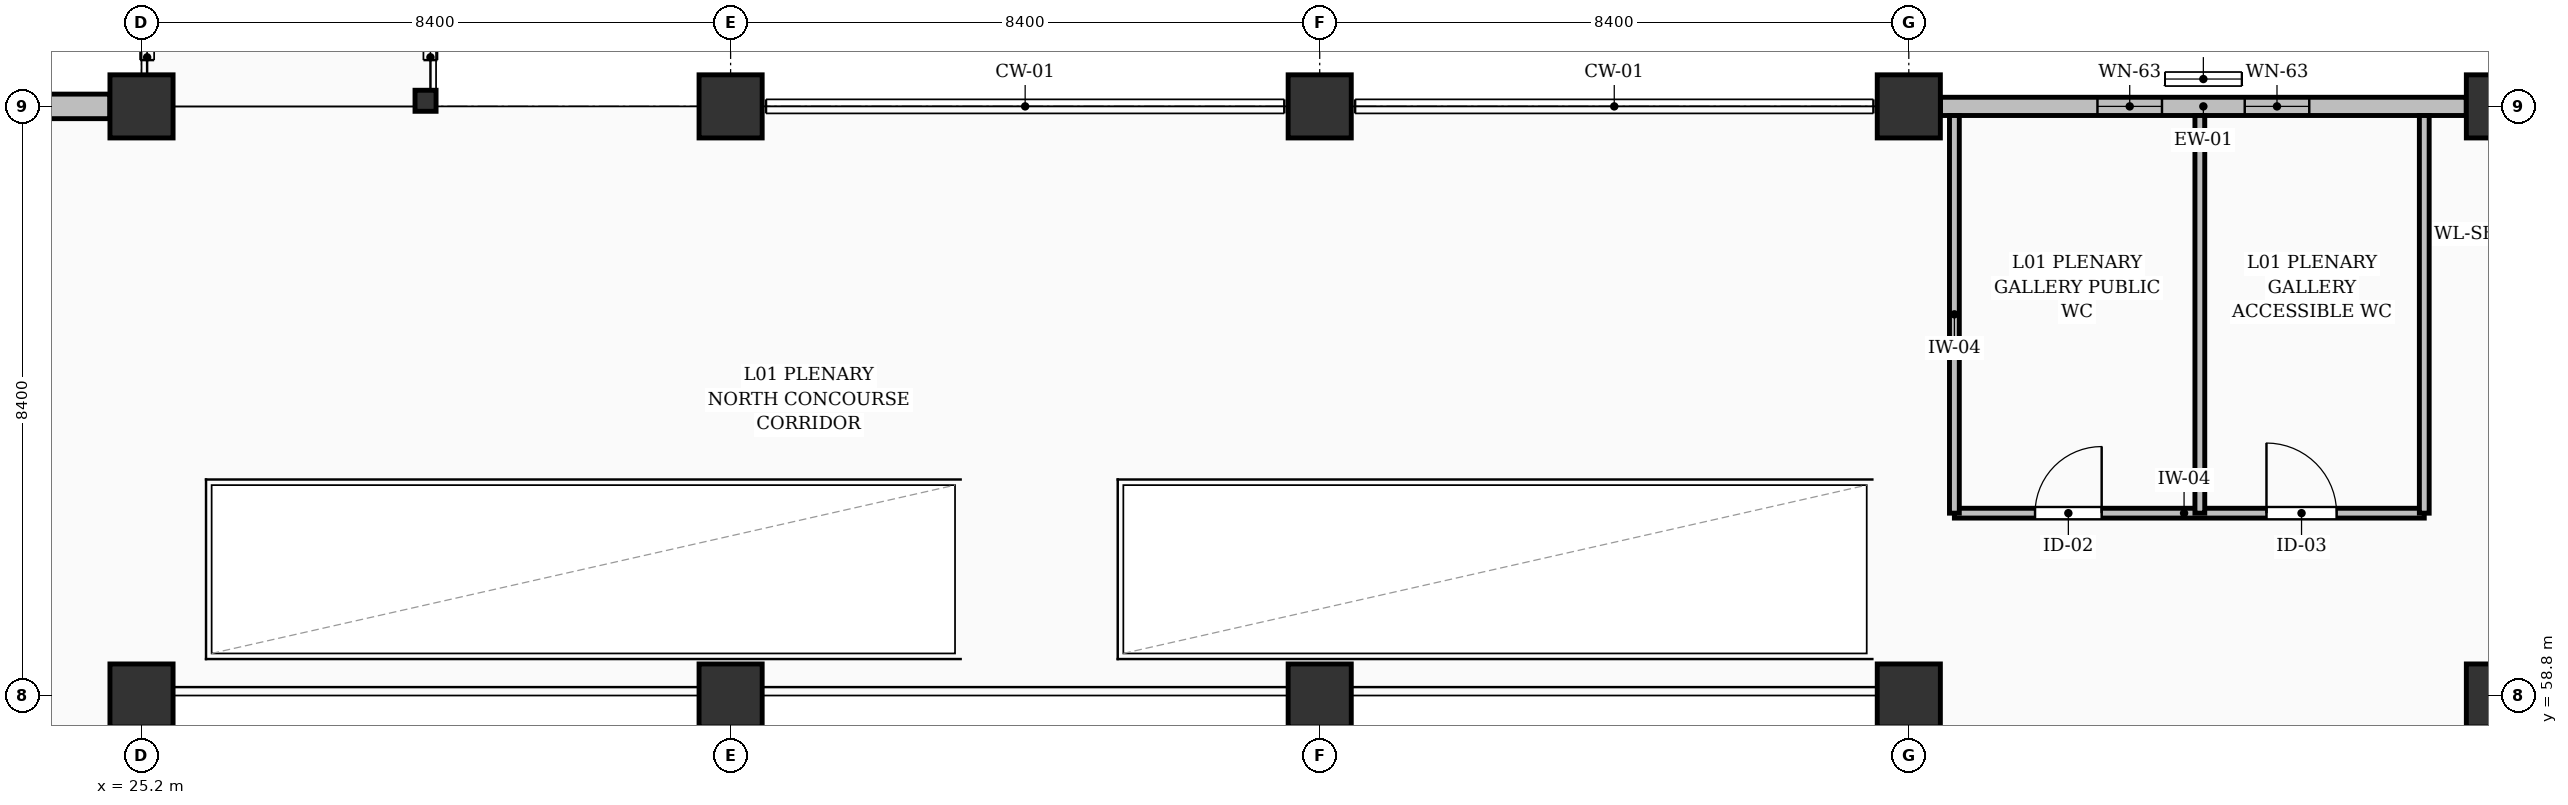
"""IFC4 building model, lengths in metres.
Left out: names, types, materials, properties, quantities, classifications, styles, units other than length and angle.
Written with IfcOpenShell. Run it as: python <this file> out.ifc"""

import sys

from ifc_helpers import new_model, si_unit, direction, frame, frame_2d, origin, origin_2d, place, context, subcontext, project, spatial, rectangle, hollow_rectangle, extrude, element, fill, save


model = new_model("IFC4")
c1 = context("Model", 3, precision=1e-05, world=origin(), true_north=direction((0.0, 1.0)))
c2 = subcontext(c1, "Body", "Model", "MODEL_VIEW")
j1 = project(units=[si_unit("LENGTHUNIT", "METRE"), si_unit("PLANEANGLEUNIT", "RADIAN")], contexts=[c1])
p1 = place(None, origin())
s1 = spatial("IfcSite", under=j1, at=p1, CompositionType="ELEMENT")
p2 = place(p1, origin())
s2 = spatial("IfcBuilding", under=s1, at=p2, CompositionType="ELEMENT")
p3 = place(p2, frame((0.0, 0.0, 3.92)))
s3 = spatial("IfcBuildingStorey", under=s2, at=p3, CompositionType="ELEMENT", Elevation=3.92)
for number, where, z_axis, x_axis in (
    (1, (25.2, 58.8, 0.0), (0.0, 0.0, 1.0), (1.0, 0.0, 0.0)),
    (2, (25.2, 67.2, 0.0), (0.0, 0.0, 1.0), (1.0, 0.0, 0.0)),
    (3, (33.6, 58.8, 0.0), (0.0, 0.0, 1.0), (1.0, 0.0, 0.0)),
    (4, (33.6, 67.2, 0.0), (0.0, 0.0, 1.0), (1.0, 0.0, 0.0)),
    (5, (42.0, 58.8, 0.0), (0.0, 0.0, 1.0), (1.0, 0.0, 0.0)),
    (6, (42.0, 67.2, 0.0), (0.0, 0.0, 1.0), (1.0, 0.0, 0.0)),
    (7, (50.4, 58.8, 0.0), (0.0, 0.0, 1.0), (1.0, 0.0, 0.0)),
    (8, (50.4, 67.2, 0.0), (0.0, 0.0, 1.0), (1.0, 0.0, 0.0)),
    (9, (58.8, 58.8, 0.0), (0.0, 0.0, 1.0), (1.0, 0.0, 0.0)),
    (10, (58.8, 67.2, 0.0), (0.0, 0.0, 1.0), (1.0, 0.0, 0.0)),
):
    element("IfcColumn", number, at=place(p3, frame(where, z_axis=z_axis, x_axis=x_axis)), inside=s3, PredefinedType="COLUMN", context=c2, shape_type="SweptSolid", body=[
        extrude(rectangle(XDim=0.9, YDim=0.9, at=origin_2d()), origin(), (0.0, 0.0, 1.0), 3.64),
    ])
p4 = place(p3, frame((29.25, 67.28, 0.0), z_axis=(0.0, 0.0, 1.0), x_axis=(1.0, 0.0, 0.0)))
e11 = element("IfcColumn", 11, at=p4, inside=s3, PredefinedType="COLUMN", context=c2, shape_type="SweptSolid", body=[
    extrude(hollow_rectangle(XDim=0.3, YDim=0.3, WallThickness=0.016, at=origin_2d()), origin(), (0.0, 0.0, 1.0), 3.64),
])
p5 = place(p3, frame((17.251, 67.2, 0.0), z_axis=(0.0, 0.0, 1.0), x_axis=(1.0, 0.0, 0.0)))
e12 = element("IfcWall", 12, at=p5, inside=s3, PredefinedType="SOLIDWALL", context=c2, shape_type="SweptSolid", body=[
    extrude(rectangle(XDim=7.498, YDim=0.35, at=frame_2d((3.749, 0.0))), origin(), (0.0, 0.0, 1.0), 2.445),
])
p6 = place(p5, frame((2.339, 0.0, 0.3)))
e13 = element("IfcOpeningElement", 13, at=p6, cuts=e12, PredefinedType="OPENING", context=c2, shape_type="SweptSolid", body=[
    extrude(rectangle(XDim=0.72, YDim=1.85, at=frame_2d((0.36, 0.925))), frame((0.0, 0.185, 0.0), z_axis=(0.0, -1.0, 0.0), x_axis=(1.0, 0.0, 0.0)), (0.0, 0.0, 1.0), 0.37),
])
p7 = place(p5, frame((4.439, 0.0, 0.3)))
e14 = element("IfcOpeningElement", 14, at=p7, cuts=e12, PredefinedType="OPENING", context=c2, shape_type="SweptSolid", body=[
    extrude(rectangle(XDim=0.72, YDim=1.85, at=frame_2d((0.36, 0.925))), frame((0.0, 0.185, 0.0), z_axis=(0.0, -1.0, 0.0), x_axis=(1.0, 0.0, 0.0)), (0.0, 0.0, 1.0), 0.37),
])
p8 = place(p3, frame((50.851, 67.2, 0.0), z_axis=(0.0, 0.0, 1.0), x_axis=(1.0, 0.0, 0.0)))
e15 = element("IfcWall", 15, at=p8, inside=s3, PredefinedType="SOLIDWALL", context=c2, shape_type="SweptSolid", body=[
    extrude(rectangle(XDim=7.498, YDim=0.26, at=frame_2d((3.749, 0.0))), origin(), (0.0, 0.0, 1.0), 2.445),
])
p9 = place(p8, frame((2.239, 0.0, 0.3)))
e16 = element("IfcOpeningElement", 16, at=p9, cuts=e15, PredefinedType="OPENING", context=c2, shape_type="SweptSolid", body=[
    extrude(rectangle(XDim=0.92, YDim=1.75, at=frame_2d((0.46, 0.875))), frame((0.0, 0.14, 0.0), z_axis=(0.0, -1.0, 0.0), x_axis=(1.0, 0.0, 0.0)), (0.0, 0.0, 1.0), 0.28),
])
p10 = place(p8, frame((4.339, 0.0, 0.3)))
e17 = element("IfcOpeningElement", 17, at=p10, cuts=e15, PredefinedType="OPENING", context=c2, shape_type="SweptSolid", body=[
    extrude(rectangle(XDim=0.92, YDim=1.75, at=frame_2d((0.46, 0.875))), frame((0.0, 0.14, 0.0), z_axis=(0.0, -1.0, 0.0), x_axis=(1.0, 0.0, 0.0)), (0.0, 0.0, 1.0), 0.28),
])
p11 = place(p3, frame((51.05, 61.4, 0.0), z_axis=(0.0, 0.0, 1.0), x_axis=(1.0, 0.0, 0.0)))
e18 = element("IfcWall", 18, at=p11, inside=s3, PredefinedType="PARTITIONING", context=c2, shape_type="SweptSolid", body=[
    extrude(rectangle(XDim=6.7, YDim=0.14, at=frame_2d((3.35, 0.0))), origin(), (0.0, 0.0, 1.0), 3.36),
])
p12 = place(p11, frame((1.15, 0.0, 0.0)))
e19 = element("IfcOpeningElement", 19, at=p12, cuts=e18, PredefinedType="OPENING", context=c2, shape_type="SweptSolid", body=[
    extrude(rectangle(XDim=0.95, YDim=2.1, at=frame_2d((0.475, 1.05))), frame((0.0, 0.08, 0.0), z_axis=(0.0, -1.0, 0.0), x_axis=(1.0, 0.0, 0.0)), (0.0, 0.0, 1.0), 0.16),
])
p13 = place(p11, frame((4.45, 0.0, 0.0)))
e20 = element("IfcOpeningElement", 20, at=p13, cuts=e18, PredefinedType="OPENING", context=c2, shape_type="SweptSolid", body=[
    extrude(rectangle(XDim=1.0, YDim=2.1, at=frame_2d((0.5, 1.05))), frame((0.0, 0.08, 0.0), z_axis=(0.0, -1.0, 0.0), x_axis=(1.0, 0.0, 0.0)), (0.0, 0.0, 1.0), 0.16),
])
for number, where, z_axis, x_axis in (
    (21, (51.05, 61.4, 0.0), (0.0, 0.0, 1.0), (0.0, 1.0, 0.0)),
    (22, (54.55, 61.4, 0.0), (0.0, 0.0, 1.0), (0.0, 1.0, 0.0)),
    (23, (57.75, 61.4, 0.0), (0.0, 0.0, 1.0), (0.0, 1.0, 0.0)),
):
    element("IfcWall", number, at=place(p3, frame(where, z_axis=z_axis, x_axis=x_axis)), inside=s3, PredefinedType="PARTITIONING", context=c2, shape_type="SweptSolid", body=[
        extrude(rectangle(XDim=5.67, YDim=0.14, at=frame_2d((2.835, 0.0))), origin(), (0.0, 0.0, 1.0), 3.36),
    ])
p14 = place(p9, origin())
e24 = element("IfcWindow", 24, at=p14, inside=s3, PartitioningType="SINGLE_PANEL", PredefinedType="WINDOW", context=c2, shape_type="SweptSolid", body=[
    extrude(rectangle(XDim=0.92, YDim=1.75, at=frame_2d((0.46, 0.875))), frame((0.0, 0.03, 0.0), z_axis=(0.0, -1.0, 0.0), x_axis=(1.0, 0.0, 0.0)), (0.0, 0.0, 1.0), 0.06),
])
fill(e16, e24)
p15 = place(p10, origin())
e25 = element("IfcWindow", 25, at=p15, inside=s3, PartitioningType="SINGLE_PANEL", PredefinedType="WINDOW", context=c2, shape_type="SweptSolid", body=[
    extrude(rectangle(XDim=0.92, YDim=1.75, at=frame_2d((0.46, 0.875))), frame((0.0, 0.03, 0.0), z_axis=(0.0, -1.0, 0.0), x_axis=(1.0, 0.0, 0.0)), (0.0, 0.0, 1.0), 0.06),
])
fill(e17, e25)
p16 = place(p12, origin())
e26 = element("IfcDoor", 26, at=p16, inside=s3, OperationType="SINGLE_SWING_RIGHT", PredefinedType="DOOR", context=c2, shape_type="SweptSolid", body=[
    extrude(rectangle(XDim=0.95, YDim=2.1, at=frame_2d((0.475, 1.05))), frame((0.0, 0.025, 0.0), z_axis=(0.0, -1.0, 0.0), x_axis=(1.0, 0.0, 0.0)), (0.0, 0.0, 1.0), 0.05),
])
fill(e19, e26)
p17 = place(p13, origin())
e27 = element("IfcDoor", 27, at=p17, inside=s3, OperationType="SINGLE_SWING_LEFT", PredefinedType="DOOR", context=c2, shape_type="SweptSolid", body=[
    extrude(rectangle(XDim=1.0, YDim=2.1, at=frame_2d((0.5, 1.05))), frame((0.0, 0.025, 0.0), z_axis=(0.0, -1.0, 0.0), x_axis=(1.0, 0.0, 0.0)), (0.0, 0.0, 1.0), 0.05),
])
fill(e20, e27)
save(model, sys.argv[1])
